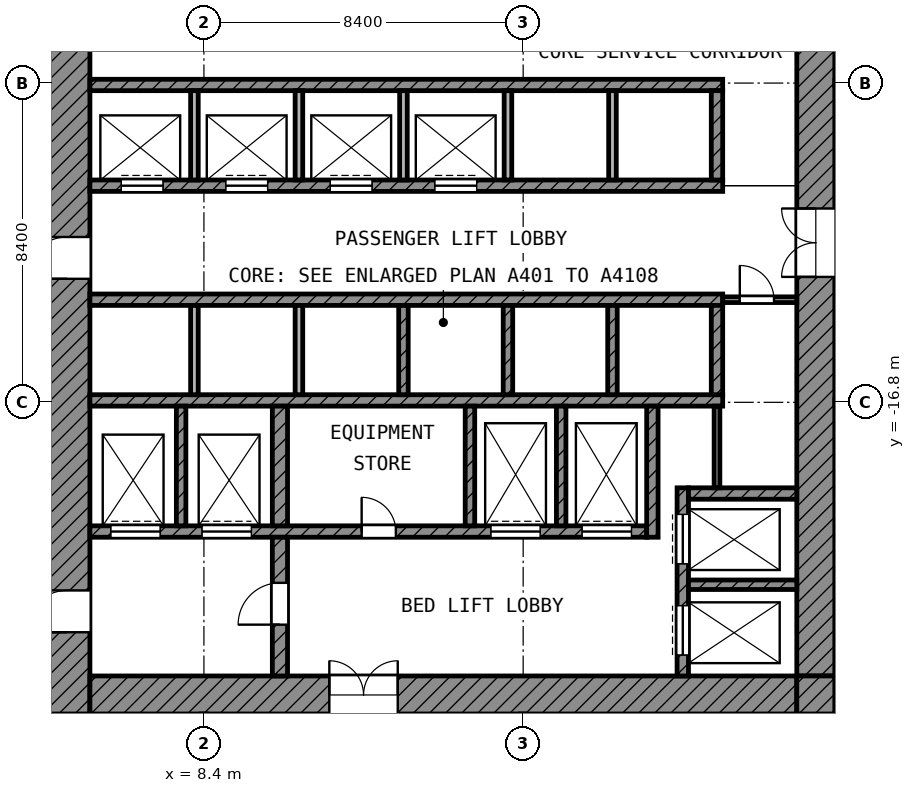
"""IFC4 building model, lengths in metres.
Left out: names, types, materials, properties, quantities, classifications, styles, units other than length and angle.
Written with IfcOpenShell. Run it as: python <this file> out.ifc"""

import sys

from ifc_helpers import new_model, si_unit, direction, frame, frame_2d, origin, place, context, subcontext, project, spatial, rectangle, extrude, element, fill, save


model = new_model("IFC4")
c1 = context("Model", 3, precision=1e-05, world=origin(), true_north=direction((0.0, 1.0)))
c2 = subcontext(c1, "Body", "Model", "MODEL_VIEW")
j1 = project(units=[si_unit("LENGTHUNIT", "METRE"), si_unit("PLANEANGLEUNIT", "RADIAN")], contexts=[c1])
p1 = place(None, origin())
s1 = spatial("IfcSite", under=j1, at=p1, CompositionType="ELEMENT")
p2 = place(p1, origin())
s2 = spatial("IfcBuilding", under=s1, at=p2, CompositionType="ELEMENT")
p3 = place(p2, frame((0.0, 0.0, 145.0)))
s3 = spatial("IfcBuildingStorey", under=s2, at=p3, CompositionType="ELEMENT", Elevation=145.0)
p4 = place(p3, frame((4.8, -25.0, 0.0), z_axis=(0.0, 0.0, 1.0), x_axis=(0.0, 1.0, 0.0)))
e1 = element("IfcWall", 1, at=p4, inside=s3, PredefinedType="SHEAR", context=c2, shape_type="SweptSolid", body=[
    extrude(rectangle(XDim=19.6, YDim=1.2, at=frame_2d((9.8, 0.0))), origin(), (0.0, 0.0, 1.0), 3.6),
])
p5 = place(p4, frame((11.45, 0.0, 0.0)))
e2 = element("IfcOpeningElement", 2, at=p5, cuts=e1, PredefinedType="OPENING", context=c2, shape_type="SweptSolid", body=[
    extrude(rectangle(XDim=1.1, YDim=2.1, at=frame_2d((0.55, 1.05))), frame((0.0, 0.61, 0.0), z_axis=(0.0, -1.0, 0.0), x_axis=(1.0, 0.0, 0.0)), (0.0, 0.0, 1.0), 1.22),
])
p6 = place(p4, frame((2.15, 0.0, 0.0)))
e3 = element("IfcOpeningElement", 3, at=p6, cuts=e1, PredefinedType="OPENING", context=c2, shape_type="SweptSolid", body=[
    extrude(rectangle(XDim=1.1, YDim=2.1, at=frame_2d((0.55, 1.05))), frame((0.0, 0.61, 0.0), z_axis=(0.0, -1.0, 0.0), x_axis=(1.0, 0.0, 0.0)), (0.0, 0.0, 1.0), 1.22),
])
p7 = place(p3, frame((24.5, -24.0, 0.0), z_axis=(0.0, 0.0, 1.0), x_axis=(0.0, 1.0, 0.0)))
e4 = element("IfcWall", 4, at=p7, inside=s3, PredefinedType="SHEAR", context=c2, shape_type="SweptSolid", body=[
    extrude(rectangle(XDim=18.6, YDim=1.0, at=frame_2d((9.3, 0.0))), origin(), (0.0, 0.0, 1.0), 3.6),
])
p8 = place(p7, frame((10.5, 0.0, 0.0)))
e5 = element("IfcOpeningElement", 5, at=p8, cuts=e4, PredefinedType="OPENING", context=c2, shape_type="SweptSolid", body=[
    extrude(rectangle(XDim=1.8, YDim=2.1, at=frame_2d((0.9, 1.05))), frame((0.0, 0.51, 0.0), z_axis=(0.0, -1.0, 0.0), x_axis=(1.0, 0.0, 0.0)), (0.0, 0.0, 1.0), 1.02),
])
p9 = place(p3, frame((5.4, -24.5, 0.0), z_axis=(0.0, 0.0, 1.0), x_axis=(1.0, 0.0, 0.0)))
e6 = element("IfcWall", 6, at=p9, inside=s3, PredefinedType="SHEAR", context=c2, shape_type="SweptSolid", body=[
    extrude(rectangle(XDim=18.6, YDim=1.0, at=frame_2d((9.3, 0.0))), origin(), (0.0, 0.0, 1.0), 3.6),
])
p10 = place(p9, frame((6.3, 0.0, 0.0)))
e7 = element("IfcOpeningElement", 7, at=p10, cuts=e6, PredefinedType="OPENING", context=c2, shape_type="SweptSolid", body=[
    extrude(rectangle(XDim=1.8, YDim=2.1, at=frame_2d((0.9, 1.05))), frame((0.0, 0.51, 0.0), z_axis=(0.0, -1.0, 0.0), x_axis=(1.0, 0.0, 0.0)), (0.0, 0.0, 1.0), 1.02),
])
p11 = place(p3, frame((24.5, -25.0, 0.0), z_axis=(0.0, 0.0, 1.0), x_axis=(0.0, 1.0, 0.0)))
e8 = element("IfcWall", 8, at=p11, inside=s3, PredefinedType="SHEAR", context=c2, shape_type="SweptSolid", body=[
    extrude(rectangle(XDim=1.0, YDim=1.0, at=frame_2d((0.5, 0.0))), origin(), (0.0, 0.0, 1.0), 3.6),
])
p12 = place(p3, frame((5.4, -8.45, 0.0), z_axis=(0.0, 0.0, 1.0), x_axis=(1.0, 0.0, 0.0)))
e9 = element("IfcWall", 9, at=p12, inside=s3, PredefinedType="SHEAR", context=c2, shape_type="SweptSolid", body=[
    extrude(rectangle(XDim=16.65, YDim=0.3, at=frame_2d((8.325, 0.0))), origin(), (0.0, 0.0, 1.0), 3.6),
])
p13 = place(p3, frame((5.4, -11.1, 0.0), z_axis=(0.0, 0.0, 1.0), x_axis=(1.0, 0.0, 0.0)))
e10 = element("IfcWall", 10, at=p13, inside=s3, PredefinedType="SHEAR", context=c2, shape_type="SweptSolid", body=[
    extrude(rectangle(XDim=16.65, YDim=0.3, at=frame_2d((8.325, 0.0))), origin(), (0.0, 0.0, 1.0), 3.6),
])
p14 = place(p13, frame((0.825, 0.0, 0.0)))
e11 = element("IfcOpeningElement", 11, at=p14, cuts=e10, PredefinedType="OPENING", context=c2, shape_type="SweptSolid", body=[
    extrude(rectangle(XDim=1.1, YDim=2.1, at=frame_2d((0.55, 1.05))), frame((0.0, 0.16, 0.0), z_axis=(0.0, -1.0, 0.0), x_axis=(1.0, 0.0, 0.0)), (0.0, 0.0, 1.0), 0.32),
])
p15 = place(p13, frame((3.575, 0.0, 0.0)))
e12 = element("IfcOpeningElement", 12, at=p15, cuts=e10, PredefinedType="OPENING", context=c2, shape_type="SweptSolid", body=[
    extrude(rectangle(XDim=1.1, YDim=2.1, at=frame_2d((0.55, 1.05))), frame((0.0, 0.16, 0.0), z_axis=(0.0, -1.0, 0.0), x_axis=(1.0, 0.0, 0.0)), (0.0, 0.0, 1.0), 0.32),
])
p16 = place(p13, frame((6.325, 0.0, 0.0)))
e13 = element("IfcOpeningElement", 13, at=p16, cuts=e10, PredefinedType="OPENING", context=c2, shape_type="SweptSolid", body=[
    extrude(rectangle(XDim=1.1, YDim=2.1, at=frame_2d((0.55, 1.05))), frame((0.0, 0.16, 0.0), z_axis=(0.0, -1.0, 0.0), x_axis=(1.0, 0.0, 0.0)), (0.0, 0.0, 1.0), 0.32),
])
p17 = place(p13, frame((9.075, 0.0, 0.0)))
e14 = element("IfcOpeningElement", 14, at=p17, cuts=e10, PredefinedType="OPENING", context=c2, shape_type="SweptSolid", body=[
    extrude(rectangle(XDim=1.1, YDim=2.1, at=frame_2d((0.55, 1.05))), frame((0.0, 0.16, 0.0), z_axis=(0.0, -1.0, 0.0), x_axis=(1.0, 0.0, 0.0)), (0.0, 0.0, 1.0), 0.32),
])
for number, where, z_axis, x_axis in (
    (15, (5.4, -14.1, 0.0), (0.0, 0.0, 1.0), (1.0, 0.0, 0.0)),
    (16, (5.4, -16.75, 0.0), (0.0, 0.0, 1.0), (1.0, 0.0, 0.0)),
):
    element("IfcWall", number, at=place(p3, frame(where, z_axis=z_axis, x_axis=x_axis)), inside=s3, PredefinedType="SHEAR", context=c2, shape_type="SweptSolid", body=[
        extrude(rectangle(XDim=16.65, YDim=0.3, at=frame_2d((8.325, 0.0))), origin(), (0.0, 0.0, 1.0), 3.6),
    ])
p18 = place(p3, frame((5.4, -20.2, 0.0), z_axis=(0.0, 0.0, 1.0), x_axis=(1.0, 0.0, 0.0)))
e17 = element("IfcWall", 17, at=p18, inside=s3, PredefinedType="SHEAR", context=c2, shape_type="SweptSolid", body=[
    extrude(rectangle(XDim=14.65, YDim=0.3, at=frame_2d((7.325, 0.0))), origin(), (0.0, 0.0, 1.0), 3.6),
])
p19 = place(p18, frame((10.55, 0.0, 0.0)))
e18 = element("IfcOpeningElement", 18, at=p19, cuts=e17, PredefinedType="OPENING", context=c2, shape_type="SweptSolid", body=[
    extrude(rectangle(XDim=1.3, YDim=2.1, at=frame_2d((0.65, 1.05))), frame((0.0, 0.16, 0.0), z_axis=(0.0, -1.0, 0.0), x_axis=(1.0, 0.0, 0.0)), (0.0, 0.0, 1.0), 0.32),
])
p20 = place(p18, frame((12.95, 0.0, 0.0)))
e19 = element("IfcOpeningElement", 19, at=p20, cuts=e17, PredefinedType="OPENING", context=c2, shape_type="SweptSolid", body=[
    extrude(rectangle(XDim=1.3, YDim=2.1, at=frame_2d((0.65, 1.05))), frame((0.0, 0.16, 0.0), z_axis=(0.0, -1.0, 0.0), x_axis=(1.0, 0.0, 0.0)), (0.0, 0.0, 1.0), 0.32),
])
p21 = place(p18, frame((0.55, 0.0, 0.0)))
e20 = element("IfcOpeningElement", 20, at=p21, cuts=e17, PredefinedType="OPENING", context=c2, shape_type="SweptSolid", body=[
    extrude(rectangle(XDim=1.3, YDim=2.1, at=frame_2d((0.65, 1.05))), frame((0.0, 0.16, 0.0), z_axis=(0.0, -1.0, 0.0), x_axis=(1.0, 0.0, 0.0)), (0.0, 0.0, 1.0), 0.32),
])
p22 = place(p18, frame((2.95, 0.0, 0.0)))
e21 = element("IfcOpeningElement", 21, at=p22, cuts=e17, PredefinedType="OPENING", context=c2, shape_type="SweptSolid", body=[
    extrude(rectangle(XDim=1.3, YDim=2.1, at=frame_2d((0.65, 1.05))), frame((0.0, 0.16, 0.0), z_axis=(0.0, -1.0, 0.0), x_axis=(1.0, 0.0, 0.0)), (0.0, 0.0, 1.0), 0.32),
])
p23 = place(p18, frame((7.15, 0.0, 0.0)))
e22 = element("IfcOpeningElement", 22, at=p23, cuts=e17, PredefinedType="OPENING", context=c2, shape_type="SweptSolid", body=[
    extrude(rectangle(XDim=0.9, YDim=2.1, at=frame_2d((0.45, 1.05))), frame((0.0, 0.16, 0.0), z_axis=(0.0, -1.0, 0.0), x_axis=(1.0, 0.0, 0.0)), (0.0, 0.0, 1.0), 0.32),
])
p24 = place(p3, frame((10.4, -24.0, 0.0), z_axis=(0.0, 0.0, 1.0), x_axis=(0.0, 1.0, 0.0)))
e23 = element("IfcWall", 23, at=p24, inside=s3, PredefinedType="SHEAR", context=c2, shape_type="SweptSolid", body=[
    extrude(rectangle(XDim=3.65, YDim=0.4, at=frame_2d((1.825, 0.0))), origin(), (0.0, 0.0, 1.0), 3.6),
])
p25 = place(p24, frame((1.35, 0.0, 0.0)))
e24 = element("IfcOpeningElement", 24, at=p25, cuts=e23, PredefinedType="OPENING", context=c2, shape_type="SweptSolid", body=[
    extrude(rectangle(XDim=1.1, YDim=2.1, at=frame_2d((0.55, 1.05))), frame((0.0, 0.21, 0.0), z_axis=(0.0, -1.0, 0.0), x_axis=(1.0, 0.0, 0.0)), (0.0, 0.0, 1.0), 0.42),
])
p26 = place(p3, frame((10.4, -20.05, 0.0), z_axis=(0.0, 0.0, 1.0), x_axis=(0.0, 1.0, 0.0)))
e25 = element("IfcWall", 25, at=p26, inside=s3, PredefinedType="SHEAR", context=c2, shape_type="SweptSolid", body=[
    extrude(rectangle(XDim=3.15, YDim=0.4, at=frame_2d((1.575, 0.0))), origin(), (0.0, 0.0, 1.0), 3.6),
])
p27 = place(p3, frame((20.2, -20.35, 0.0), z_axis=(0.0, 0.0, 1.0), x_axis=(0.0, 1.0, 0.0)))
e26 = element("IfcWall", 26, at=p27, inside=s3, PredefinedType="SHEAR", context=c2, shape_type="SweptSolid", body=[
    extrude(rectangle(XDim=3.45, YDim=0.3, at=frame_2d((1.725, 0.0))), origin(), (0.0, 0.0, 1.0), 3.6),
])
p28 = place(p3, frame((21.9, -10.95, 0.0), z_axis=(0.0, 0.0, 1.0), x_axis=(0.0, 1.0, 0.0)))
e27 = element("IfcWall", 27, at=p28, inside=s3, PredefinedType="SHEAR", context=c2, shape_type="SweptSolid", body=[
    extrude(rectangle(XDim=2.35, YDim=0.3, at=frame_2d((1.175, 0.0))), origin(), (0.0, 0.0, 1.0), 3.6),
])
p29 = place(p3, frame((21.9, -16.6, 0.0), z_axis=(0.0, 0.0, 1.0), x_axis=(0.0, 1.0, 0.0)))
e28 = element("IfcWall", 28, at=p29, inside=s3, PredefinedType="SHEAR", context=c2, shape_type="SweptSolid", body=[
    extrude(rectangle(XDim=2.35, YDim=0.3, at=frame_2d((1.175, 0.0))), origin(), (0.0, 0.0, 1.0), 3.6),
])
p30 = place(p3, frame((21.15, -19.2, 0.0), z_axis=(0.0, 0.0, 1.0), x_axis=(1.0, 0.0, 0.0)))
e29 = element("IfcWall", 29, at=p30, inside=s3, PredefinedType="SHEAR", context=c2, shape_type="SweptSolid", body=[
    extrude(rectangle(XDim=2.85, YDim=0.3, at=frame_2d((1.425, 0.0))), origin(), (0.0, 0.0, 1.0), 3.6),
])
p31 = place(p3, frame((21.0, -24.0, 0.0), z_axis=(0.0, 0.0, 1.0), x_axis=(0.0, 1.0, 0.0)))
e30 = element("IfcWall", 30, at=p31, inside=s3, PredefinedType="SHEAR", context=c2, shape_type="SweptSolid", body=[
    extrude(rectangle(XDim=4.95, YDim=0.3, at=frame_2d((2.475, 0.0))), origin(), (0.0, 0.0, 1.0), 3.6),
])
p32 = place(p31, frame((2.95, 0.0, 0.0)))
e31 = element("IfcOpeningElement", 31, at=p32, cuts=e30, PredefinedType="OPENING", context=c2, shape_type="SweptSolid", body=[
    extrude(rectangle(XDim=1.3, YDim=2.1, at=frame_2d((0.65, 1.05))), frame((0.0, 0.16, 0.0), z_axis=(0.0, -1.0, 0.0), x_axis=(1.0, 0.0, 0.0)), (0.0, 0.0, 1.0), 0.32),
])
p33 = place(p31, frame((0.55, 0.0, 0.0)))
e32 = element("IfcOpeningElement", 32, at=p33, cuts=e30, PredefinedType="OPENING", context=c2, shape_type="SweptSolid", body=[
    extrude(rectangle(XDim=1.3, YDim=2.1, at=frame_2d((0.65, 1.05))), frame((0.0, 0.16, 0.0), z_axis=(0.0, -1.0, 0.0), x_axis=(1.0, 0.0, 0.0)), (0.0, 0.0, 1.0), 0.32),
])
p34 = place(p3, frame((21.15, -21.6, 0.0), z_axis=(0.0, 0.0, 1.0), x_axis=(1.0, 0.0, 0.0)))
e33 = element("IfcWall", 33, at=p34, inside=s3, PredefinedType="SHEAR", context=c2, shape_type="SweptSolid", body=[
    extrude(rectangle(XDim=2.85, YDim=0.25, at=frame_2d((1.425, 0.0))), origin(), (0.0, 0.0, 1.0), 3.6),
])
for number, where, z_axis, x_axis in (
    (34, (7.8, -20.05, 0.0), (0.0, 0.0, 1.0), (0.0, 1.0, 0.0)),
    (35, (15.4, -20.05, 0.0), (0.0, 0.0, 1.0), (0.0, 1.0, 0.0)),
    (36, (17.8, -20.05, 0.0), (0.0, 0.0, 1.0), (0.0, 1.0, 0.0)),
):
    element("IfcWall", number, at=place(p3, frame(where, z_axis=z_axis, x_axis=x_axis)), inside=s3, PredefinedType="SHEAR", context=c2, shape_type="SweptSolid", body=[
        extrude(rectangle(XDim=3.15, YDim=0.25, at=frame_2d((1.575, 0.0))), origin(), (0.0, 0.0, 1.0), 3.6),
    ])
for number, where, z_axis, x_axis in (
    (37, (8.15, -10.95, 0.0), (0.0, 0.0, 1.0), (0.0, 1.0, 0.0)),
    (38, (10.9, -10.95, 0.0), (0.0, 0.0, 1.0), (0.0, 1.0, 0.0)),
    (39, (13.65, -10.95, 0.0), (0.0, 0.0, 1.0), (0.0, 1.0, 0.0)),
    (40, (16.4, -10.95, 0.0), (0.0, 0.0, 1.0), (0.0, 1.0, 0.0)),
    (41, (19.15, -10.95, 0.0), (0.0, 0.0, 1.0), (0.0, 1.0, 0.0)),
):
    element("IfcWall", number, at=place(p3, frame(where, z_axis=z_axis, x_axis=x_axis)), inside=s3, PredefinedType="PARTITIONING", context=c2, shape_type="SweptSolid", body=[
        extrude(rectangle(XDim=2.35, YDim=0.2, at=frame_2d((1.175, 0.0))), origin(), (0.0, 0.0, 1.0), 3.6),
    ])
for number, where, z_axis, x_axis in (
    (42, (8.15, -16.6, 0.0), (0.0, 0.0, 1.0), (0.0, 1.0, 0.0)),
    (43, (10.9, -16.6, 0.0), (0.0, 0.0, 1.0), (0.0, 1.0, 0.0)),
):
    element("IfcWall", number, at=place(p3, frame(where, z_axis=z_axis, x_axis=x_axis)), inside=s3, PredefinedType="PARTITIONING", context=c2, shape_type="SweptSolid", body=[
        extrude(rectangle(XDim=2.35, YDim=0.2, at=frame_2d((1.175, 0.0))), origin(), (0.0, 0.0, 1.0), 3.6),
    ])
for number, where, z_axis, x_axis in (
    (44, (13.65, -16.6, 0.0), (0.0, 0.0, 1.0), (0.0, 1.0, 0.0)),
    (45, (16.4, -16.6, 0.0), (0.0, 0.0, 1.0), (0.0, 1.0, 0.0)),
    (46, (19.15, -16.6, 0.0), (0.0, 0.0, 1.0), (0.0, 1.0, 0.0)),
):
    element("IfcWall", number, at=place(p3, frame(where, z_axis=z_axis, x_axis=x_axis)), inside=s3, PredefinedType="SHEAR", context=c2, shape_type="SweptSolid", body=[
        extrude(rectangle(XDim=2.35, YDim=0.25, at=frame_2d((1.175, 0.0))), origin(), (0.0, 0.0, 1.0), 3.6),
    ])
p35 = place(p3, frame((21.9, -19.05, 0.0), z_axis=(0.0, 0.0, 1.0), x_axis=(0.0, 1.0, 0.0)))
e47 = element("IfcWall", 47, at=p35, inside=s3, PredefinedType="PARTITIONING", context=c2, shape_type="SweptSolid", body=[
    extrude(rectangle(XDim=2.15, YDim=0.15, at=frame_2d((1.075, 0.0))), origin(), (0.0, 0.0, 1.0), 3.6),
])
p36 = place(p3, frame((22.05, -14.1, 0.0), z_axis=(0.0, 0.0, 1.0), x_axis=(1.0, 0.0, 0.0)))
e48 = element("IfcWall", 48, at=p36, inside=s3, PredefinedType="PARTITIONING", context=c2, shape_type="SweptSolid", body=[
    extrude(rectangle(XDim=1.95, YDim=0.15, at=frame_2d((0.975, 0.0))), origin(), (0.0, 0.0, 1.0), 3.6),
])
p37 = place(p36, frame((0.45, 0.0, 0.0)))
e49 = element("IfcOpeningElement", 49, at=p37, cuts=e48, PredefinedType="OPENING", context=c2, shape_type="SweptSolid", body=[
    extrude(rectangle(XDim=0.9, YDim=2.1, at=frame_2d((0.45, 1.05))), frame((0.0, 0.085, 0.0), z_axis=(0.0, -1.0, 0.0), x_axis=(1.0, 0.0, 0.0)), (0.0, 0.0, 1.0), 0.17),
])
p38 = place(p3, frame((8.4, -31.782, 0.0), z_axis=(0.0, 0.0, 1.0), x_axis=(0.0, 1.0, 0.0)))
e50 = element("IfcWall", 50, at=p38, inside=s3, PredefinedType="PARTITIONING", context=c2, shape_type="SweptSolid", body=[
    extrude(rectangle(XDim=6.782, YDim=0.15, at=frame_2d((3.391, 0.0))), origin(), (0.0, 0.0, 1.0), 3.6),
])
p39 = place(p38, frame((4.182, 0.0, 0.0)))
e51 = element("IfcOpeningElement", 51, at=p39, cuts=e50, PredefinedType="OPENING", context=c2, shape_type="SweptSolid", body=[
    extrude(rectangle(XDim=1.2, YDim=2.1, at=frame_2d((0.6, 1.05))), frame((0.0, 0.085, 0.0), z_axis=(0.0, -1.0, 0.0), x_axis=(1.0, 0.0, 0.0)), (0.0, 0.0, 1.0), 0.17),
])
p40 = place(p14, origin())
e52 = element("IfcDoor", 52, at=p40, inside=s3, OperationType="DOUBLE_DOOR_SLIDING", PredefinedType="DOOR", context=c2, shape_type="SweptSolid", body=[
    extrude(rectangle(XDim=1.1, YDim=2.1, at=frame_2d((0.55, 1.05))), frame((0.0, 0.025, 0.0), z_axis=(0.0, -1.0, 0.0), x_axis=(1.0, 0.0, 0.0)), (0.0, 0.0, 1.0), 0.05),
])
fill(e11, e52)
p41 = place(p15, origin())
e53 = element("IfcDoor", 53, at=p41, inside=s3, OperationType="DOUBLE_DOOR_SLIDING", PredefinedType="DOOR", context=c2, shape_type="SweptSolid", body=[
    extrude(rectangle(XDim=1.1, YDim=2.1, at=frame_2d((0.55, 1.05))), frame((0.0, 0.025, 0.0), z_axis=(0.0, -1.0, 0.0), x_axis=(1.0, 0.0, 0.0)), (0.0, 0.0, 1.0), 0.05),
])
fill(e12, e53)
p42 = place(p16, origin())
e54 = element("IfcDoor", 54, at=p42, inside=s3, OperationType="DOUBLE_DOOR_SLIDING", PredefinedType="DOOR", context=c2, shape_type="SweptSolid", body=[
    extrude(rectangle(XDim=1.1, YDim=2.1, at=frame_2d((0.55, 1.05))), frame((0.0, 0.025, 0.0), z_axis=(0.0, -1.0, 0.0), x_axis=(1.0, 0.0, 0.0)), (0.0, 0.0, 1.0), 0.05),
])
fill(e13, e54)
p43 = place(p17, origin())
e55 = element("IfcDoor", 55, at=p43, inside=s3, OperationType="DOUBLE_DOOR_SLIDING", PredefinedType="DOOR", context=c2, shape_type="SweptSolid", body=[
    extrude(rectangle(XDim=1.1, YDim=2.1, at=frame_2d((0.55, 1.05))), frame((0.0, 0.025, 0.0), z_axis=(0.0, -1.0, 0.0), x_axis=(1.0, 0.0, 0.0)), (0.0, 0.0, 1.0), 0.05),
])
fill(e14, e55)
p44 = place(p32, origin())
e56 = element("IfcDoor", 56, at=p44, inside=s3, OperationType="DOUBLE_DOOR_SLIDING", PredefinedType="DOOR", context=c2, shape_type="SweptSolid", body=[
    extrude(rectangle(XDim=1.3, YDim=2.1, at=frame_2d((0.65, 1.05))), frame((0.0, 0.025, 0.0), z_axis=(0.0, -1.0, 0.0), x_axis=(1.0, 0.0, 0.0)), (0.0, 0.0, 1.0), 0.05),
])
fill(e31, e56)
p45 = place(p33, origin())
e57 = element("IfcDoor", 57, at=p45, inside=s3, OperationType="DOUBLE_DOOR_SLIDING", PredefinedType="DOOR", context=c2, shape_type="SweptSolid", body=[
    extrude(rectangle(XDim=1.3, YDim=2.1, at=frame_2d((0.65, 1.05))), frame((0.0, 0.025, 0.0), z_axis=(0.0, -1.0, 0.0), x_axis=(1.0, 0.0, 0.0)), (0.0, 0.0, 1.0), 0.05),
])
fill(e32, e57)
p46 = place(p19, origin())
e58 = element("IfcDoor", 58, at=p46, inside=s3, OperationType="DOUBLE_DOOR_SLIDING", PredefinedType="DOOR", context=c2, shape_type="SweptSolid", body=[
    extrude(rectangle(XDim=1.3, YDim=2.1, at=frame_2d((0.65, 1.05))), frame((0.0, 0.025, 0.0), z_axis=(0.0, -1.0, 0.0), x_axis=(1.0, 0.0, 0.0)), (0.0, 0.0, 1.0), 0.05),
])
fill(e18, e58)
p47 = place(p20, origin())
e59 = element("IfcDoor", 59, at=p47, inside=s3, OperationType="DOUBLE_DOOR_SLIDING", PredefinedType="DOOR", context=c2, shape_type="SweptSolid", body=[
    extrude(rectangle(XDim=1.3, YDim=2.1, at=frame_2d((0.65, 1.05))), frame((0.0, 0.025, 0.0), z_axis=(0.0, -1.0, 0.0), x_axis=(1.0, 0.0, 0.0)), (0.0, 0.0, 1.0), 0.05),
])
fill(e19, e59)
p48 = place(p21, origin())
e60 = element("IfcDoor", 60, at=p48, inside=s3, OperationType="DOUBLE_DOOR_SLIDING", PredefinedType="DOOR", context=c2, shape_type="SweptSolid", body=[
    extrude(rectangle(XDim=1.3, YDim=2.1, at=frame_2d((0.65, 1.05))), frame((0.0, 0.025, 0.0), z_axis=(0.0, -1.0, 0.0), x_axis=(1.0, 0.0, 0.0)), (0.0, 0.0, 1.0), 0.05),
])
fill(e20, e60)
p49 = place(p22, origin())
e61 = element("IfcDoor", 61, at=p49, inside=s3, OperationType="DOUBLE_DOOR_SLIDING", PredefinedType="DOOR", context=c2, shape_type="SweptSolid", body=[
    extrude(rectangle(XDim=1.3, YDim=2.1, at=frame_2d((0.65, 1.05))), frame((0.0, 0.025, 0.0), z_axis=(0.0, -1.0, 0.0), x_axis=(1.0, 0.0, 0.0)), (0.0, 0.0, 1.0), 0.05),
])
fill(e21, e61)
p50 = place(p5, origin())
e62 = element("IfcDoor", 62, at=p50, inside=s3, OperationType="SINGLE_SWING_LEFT", PredefinedType="DOOR", context=c2, shape_type="SweptSolid", body=[
    extrude(rectangle(XDim=1.1, YDim=2.1, at=frame_2d((0.55, 1.05))), frame((0.0, 0.025, 0.0), z_axis=(0.0, -1.0, 0.0), x_axis=(1.0, 0.0, 0.0)), (0.0, 0.0, 1.0), 0.05),
])
fill(e2, e62)
p51 = place(p6, origin())
e63 = element("IfcDoor", 63, at=p51, inside=s3, OperationType="SINGLE_SWING_LEFT", PredefinedType="DOOR", context=c2, shape_type="SweptSolid", body=[
    extrude(rectangle(XDim=1.1, YDim=2.1, at=frame_2d((0.55, 1.05))), frame((0.0, 0.025, 0.0), z_axis=(0.0, -1.0, 0.0), x_axis=(1.0, 0.0, 0.0)), (0.0, 0.0, 1.0), 0.05),
])
fill(e3, e63)
p52 = place(p25, origin())
e64 = element("IfcDoor", 64, at=p52, inside=s3, OperationType="SINGLE_SWING_LEFT", PredefinedType="DOOR", context=c2, shape_type="SweptSolid", body=[
    extrude(rectangle(XDim=1.1, YDim=2.1, at=frame_2d((0.55, 1.05))), frame((0.0, 0.025, 0.0), z_axis=(0.0, -1.0, 0.0), x_axis=(1.0, 0.0, 0.0)), (0.0, 0.0, 1.0), 0.05),
])
fill(e24, e64)
p53 = place(p8, origin())
e65 = element("IfcDoor", 65, at=p53, inside=s3, OperationType="DOUBLE_DOOR_SINGLE_SWING", PredefinedType="DOOR", context=c2, shape_type="SweptSolid", body=[
    extrude(rectangle(XDim=1.8, YDim=2.1, at=frame_2d((0.9, 1.05))), frame((0.0, 0.025, 0.0), z_axis=(0.0, -1.0, 0.0), x_axis=(1.0, 0.0, 0.0)), (0.0, 0.0, 1.0), 0.05),
])
fill(e5, e65)
p54 = place(p10, origin())
e66 = element("IfcDoor", 66, at=p54, inside=s3, OperationType="DOUBLE_DOOR_SINGLE_SWING", PredefinedType="DOOR", context=c2, shape_type="SweptSolid", body=[
    extrude(rectangle(XDim=1.8, YDim=2.1, at=frame_2d((0.9, 1.05))), frame((0.0, 0.025, 0.0), z_axis=(0.0, -1.0, 0.0), x_axis=(1.0, 0.0, 0.0)), (0.0, 0.0, 1.0), 0.05),
])
fill(e7, e66)
p55 = place(p37, origin())
e67 = element("IfcDoor", 67, at=p55, inside=s3, OperationType="SINGLE_SWING_LEFT", PredefinedType="DOOR", context=c2, shape_type="SweptSolid", body=[
    extrude(rectangle(XDim=0.9, YDim=2.1, at=frame_2d((0.45, 1.05))), frame((0.0, 0.025, 0.0), z_axis=(0.0, -1.0, 0.0), x_axis=(1.0, 0.0, 0.0)), (0.0, 0.0, 1.0), 0.05),
])
fill(e49, e67)
p56 = place(p23, origin())
e68 = element("IfcDoor", 68, at=p56, inside=s3, OperationType="SINGLE_SWING_LEFT", PredefinedType="DOOR", context=c2, shape_type="SweptSolid", body=[
    extrude(rectangle(XDim=0.9, YDim=2.1, at=frame_2d((0.45, 1.05))), frame((0.0, 0.025, 0.0), z_axis=(0.0, -1.0, 0.0), x_axis=(1.0, 0.0, 0.0)), (0.0, 0.0, 1.0), 0.05),
])
fill(e22, e68)
save(model, sys.argv[1])
